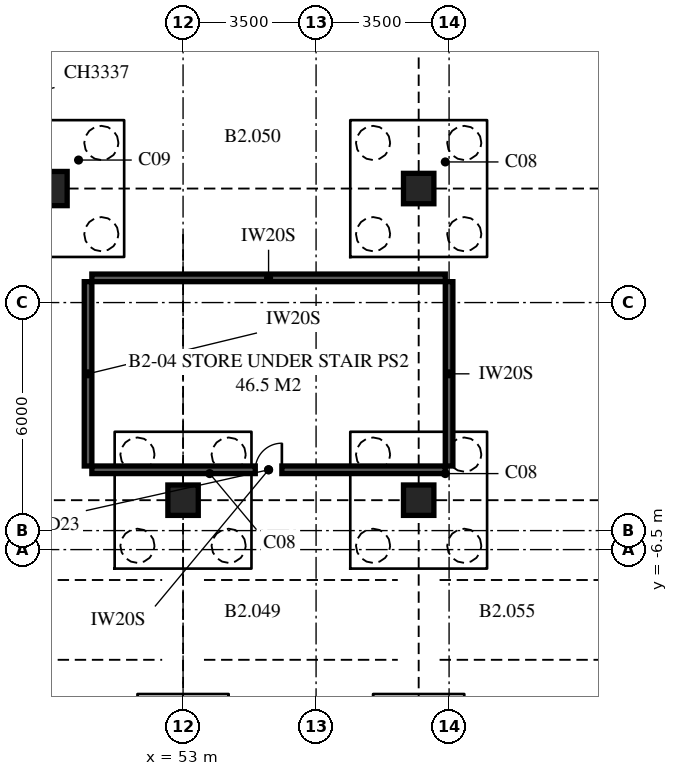
"""IFC4 building model, lengths in metres.
Left out: names, types, materials, properties, quantities, classifications, styles, units other than length and angle.
Written with IfcOpenShell. Run it as: python <this file> out.ifc"""

import sys

from ifc_helpers import new_model, si_unit, direction, frame, frame_2d, origin, origin_2d, place, context, subcontext, project, spatial, rectangle, extrude, element, fill, save


model = new_model("IFC4")
c1 = context("Model", 3, precision=1e-05, world=origin(), true_north=direction((0.0, 1.0)))
c2 = subcontext(c1, "Body", "Model", "MODEL_VIEW")
j1 = project(units=[si_unit("LENGTHUNIT", "METRE"), si_unit("PLANEANGLEUNIT", "RADIAN")], contexts=[c1])
p1 = place(None, origin())
s1 = spatial("IfcSite", under=j1, at=p1, CompositionType="ELEMENT")
p2 = place(p1, origin())
s2 = spatial("IfcBuilding", under=s1, at=p2, CompositionType="ELEMENT")
p3 = place(p2, frame((0.0, 0.0, -7.5)))
s3 = spatial("IfcBuildingStorey", under=s2, at=p3, CompositionType="ELEMENT", Elevation=-7.5)
for number, where, z_axis, x_axis in (
    (1, (53.0, -5.2, -0.6), (0.0, 0.0, 1.0), (1.0, 0.0, 0.0)),
    (2, (59.2, -5.2, -0.6), (0.0, 0.0, 1.0), (1.0, 0.0, 0.0)),
):
    element("IfcColumn", number, at=place(p3, frame(where, z_axis=z_axis, x_axis=x_axis)), inside=s3, PredefinedType="COLUMN", context=c2, shape_type="SweptSolid", body=[
        extrude(rectangle(XDim=0.8, YDim=0.8, at=origin_2d()), origin(), (0.0, 0.0, 1.0), 4.1),
    ])
p4 = place(p3, frame((49.5, 3.0, -0.6), z_axis=(0.0, 0.0, 1.0), x_axis=(1.0, 0.0, 0.0)))
e3 = element("IfcColumn", 3, at=p4, inside=s3, PredefinedType="COLUMN", context=c2, shape_type="SweptSolid", body=[
    extrude(rectangle(XDim=0.9, YDim=0.9, at=origin_2d()), origin(), (0.0, 0.0, 1.0), 4.1),
])
p5 = place(p3, frame((59.2, 3.0, -0.6), z_axis=(0.0, 0.0, 1.0), x_axis=(1.0, 0.0, 0.0)))
e4 = element("IfcColumn", 4, at=p5, inside=s3, PredefinedType="COLUMN", context=c2, shape_type="SweptSolid", body=[
    extrude(rectangle(XDim=0.8, YDim=0.8, at=origin_2d()), origin(), (0.0, 0.0, 1.0), 4.1),
])
for number, where, z_axis, x_axis in (
    (5, (50.5, -4.3, 0.0), (0.0, 0.0, 1.0), (0.0, 1.0, 0.0)),
    (6, (60.0, -4.3, 0.0), (0.0, 0.0, 1.0), (0.0, 1.0, 0.0)),
):
    element("IfcWall", number, at=place(p3, frame(where, z_axis=z_axis, x_axis=x_axis)), inside=s3, PredefinedType="SOLIDWALL", context=c2, shape_type="SweptSolid", body=[
        extrude(rectangle(XDim=4.85, YDim=0.2, at=frame_2d((2.425, 0.0))), origin(), (0.0, 0.0, 1.0), 3.5),
    ])
p6 = place(p3, frame((50.6, -4.4, 0.0), z_axis=(0.0, 0.0, 1.0), x_axis=(1.0, 0.0, 0.0)))
e7 = element("IfcWall", 7, at=p6, inside=s3, PredefinedType="SOLIDWALL", context=c2, shape_type="SweptSolid", body=[
    extrude(rectangle(XDim=9.3, YDim=0.2, at=frame_2d((4.65, 0.0))), origin(), (0.0, 0.0, 1.0), 3.5),
])
p7 = place(p6, frame((4.3, 0.0, 0.0)))
e8 = element("IfcOpeningElement", 8, at=p7, cuts=e7, PredefinedType="OPENING", context=c2, shape_type="SweptSolid", body=[
    extrude(rectangle(XDim=0.7, YDim=2.1, at=frame_2d((0.35, 1.05))), frame((0.0, 0.11, 0.0), z_axis=(0.0, -1.0, 0.0), x_axis=(1.0, 0.0, 0.0)), (0.0, 0.0, 1.0), 0.22),
])
p8 = place(p3, frame((50.6, 0.65, 0.0), z_axis=(0.0, 0.0, 1.0), x_axis=(1.0, 0.0, 0.0)))
e9 = element("IfcWall", 9, at=p8, inside=s3, PredefinedType="SOLIDWALL", context=c2, shape_type="SweptSolid", body=[
    extrude(rectangle(XDim=9.3, YDim=0.2, at=frame_2d((4.65, 0.0))), origin(), (0.0, 0.0, 1.0), 3.5),
])
p9 = place(p7, origin())
e10 = element("IfcDoor", 10, at=p9, inside=s3, OperationType="SINGLE_SWING_RIGHT", PredefinedType="DOOR", context=c2, shape_type="SweptSolid", body=[
    extrude(rectangle(XDim=0.7, YDim=2.1, at=frame_2d((0.35, 1.05))), frame((0.0, 0.025, 0.0), z_axis=(0.0, -1.0, 0.0), x_axis=(1.0, 0.0, 0.0)), (0.0, 0.0, 1.0), 0.05),
])
fill(e8, e10)
save(model, sys.argv[1])
